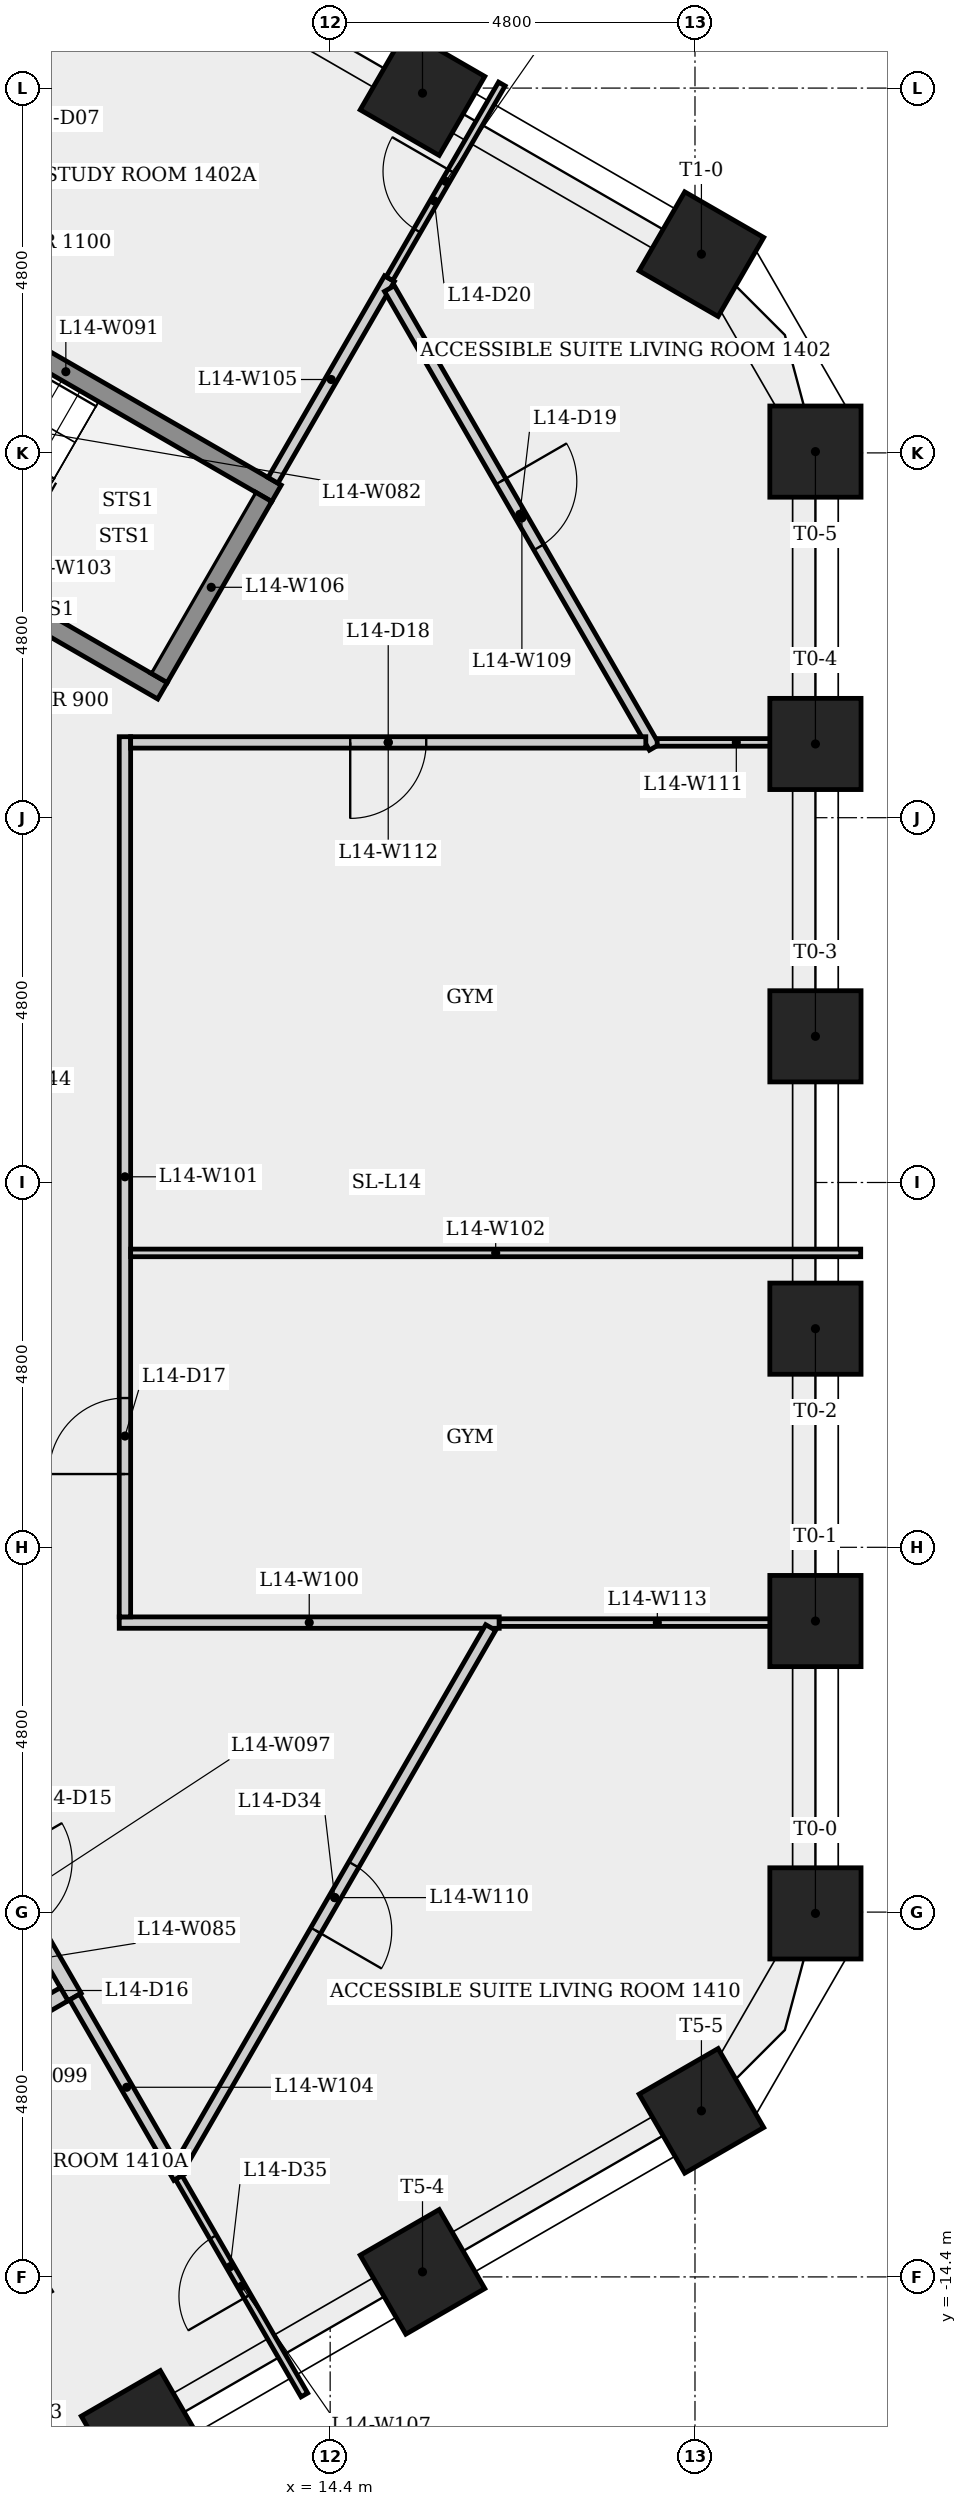
"""IFC4 building model, lengths in metres.
Left out: names, types, materials, properties, quantities, classifications, styles, units other than length and angle.
Written with IfcOpenShell. Run it as: python <this file> out.ifc"""

import sys

from ifc_helpers import new_model, si_unit, direction, frame, frame_2d, origin, origin_2d, place, context, subcontext, project, spatial, rectangle, extrude, element, fill, save


model = new_model("IFC4")
c1 = context("Model", 3, precision=1e-05, world=origin(), true_north=direction((0.0, 1.0)))
c2 = subcontext(c1, "Body", "Model", "MODEL_VIEW")
j1 = project(units=[si_unit("LENGTHUNIT", "METRE"), si_unit("PLANEANGLEUNIT", "RADIAN")], contexts=[c1])
p1 = place(None, origin())
s1 = spatial("IfcSite", under=j1, at=p1, CompositionType="ELEMENT")
p2 = place(p1, origin())
s2 = spatial("IfcBuilding", under=s1, at=p2, CompositionType="ELEMENT")
p3 = place(p2, frame((0.0, 0.0, 56.1)))
s3 = spatial("IfcBuildingStorey", under=s2, at=p3, CompositionType="ELEMENT", Elevation=56.1)
for number, where, z_axis, x_axis in (
    (1, (20.785, -9.617, 0.0), (0.0, 0.0, 1.0), (1.0, 0.0, 0.0)),
    (2, (20.785, -5.77, 0.0), (0.0, 0.0, 1.0), (1.0, 0.0, 0.0)),
    (3, (20.785, -1.923, 0.0), (0.0, 0.0, 1.0), (1.0, 0.0, 0.0)),
    (4, (20.785, 1.923, 0.0), (0.0, 0.0, 1.0), (1.0, 0.0, 0.0)),
    (5, (20.785, 5.77, 0.0), (0.0, 0.0, 1.0), (1.0, 0.0, 0.0)),
    (6, (20.785, 9.617, 0.0), (0.0, 0.0, 1.0), (1.0, 0.0, 0.0)),
    (7, (19.285, 12.215, 0.0), (0.0, 0.0, 1.0), (0.5, 0.866, 0.0)),
    (8, (15.615, 14.334, 0.0), (0.0, 0.0, 1.0), (0.5, 0.866, 0.0)),
    (9, (11.945, -16.452, 0.0), (0.0, 0.0, 1.0), (0.5, -0.866, 0.0)),
    (10, (15.615, -14.334, 0.0), (0.0, 0.0, 1.0), (0.5, -0.866, 0.0)),
    (11, (19.285, -12.215, 0.0), (0.0, 0.0, 1.0), (0.5, -0.866, 0.0)),
):
    element("IfcColumn", number, at=place(p3, frame(where, z_axis=z_axis, x_axis=x_axis)), inside=s3, PredefinedType="COLUMN", context=c2, shape_type="SweptSolid", body=[
        extrude(rectangle(XDim=1.2, YDim=1.2, at=origin_2d()), origin(), (0.0, 0.0, 1.0), 3.4),
    ])
p4 = place(p3, frame((8.151, 12.268, 0.0), z_axis=(0.0, 0.0, 1.0), x_axis=(0.866025499775, -0.499999833739, 0.0)))
e12 = element("IfcWall", 12, at=p4, inside=s3, PredefinedType="SHEAR", context=c2, shape_type="SweptSolid", body=[
    extrude(rectangle(XDim=6.4, YDim=0.25, at=frame_2d((3.2, 0.0))), origin(), (0.0, 0.0, 1.0), 3.05),
])
p5 = place(p3, frame((9.537, -8.119, 0.0), z_axis=(0.0, 0.0, 1.0), x_axis=(0.499990139034, -0.866031096941, 0.0)))
e13 = element("IfcWall", 13, at=p5, inside=s3, PredefinedType="PARTITIONING", context=c2, shape_type="SweptSolid", body=[
    extrude(rectangle(XDim=3.0, YDim=0.2, at=frame_2d((1.5, 0.0))), origin(), (0.0, 0.0, 1.0), 3.05),
])
p6 = place(p5, frame((0.935, 0.0, 0.0)))
e14 = element("IfcOpeningElement", 14, at=p6, cuts=e13, PredefinedType="OPENING", context=c2, shape_type="SweptSolid", body=[
    extrude(rectangle(XDim=1.0, YDim=2.1, at=frame_2d((0.5, 1.05))), frame((0.0, 0.11, 0.0), z_axis=(0.0, -1.0, 0.0), x_axis=(1.0, 0.0, 0.0)), (0.0, 0.0, 1.0), 0.22),
])
p7 = place(p3, frame((10.901, -10.681, 0.0), z_axis=(0.0, 0.0, 1.0), x_axis=(-0.866009402589, -0.500027713859, 0.0)))
e15 = element("IfcWall", 15, at=p7, inside=s3, PredefinedType="PARTITIONING", context=c2, shape_type="SweptSolid", body=[
    extrude(rectangle(XDim=2.1, YDim=0.2, at=frame_2d((1.05, 0.0))), origin(), (0.0, 0.0, 1.0), 3.05),
])
p8 = place(p3, frame((11.625, -5.791, 0.0), z_axis=(0.0, 0.0, 1.0), x_axis=(1.0, 0.0, 0.0)))
e16 = element("IfcWall", 16, at=p8, inside=s3, PredefinedType="PARTITIONING", context=c2, shape_type="SweptSolid", body=[
    extrude(rectangle(XDim=5.0, YDim=0.15, at=frame_2d((2.5, 0.0))), origin(), (0.0, 0.0, 1.0), 3.05),
])
p9 = place(p3, frame((11.7, -5.716, 0.0), z_axis=(0.0, 0.0, 1.0), x_axis=(0.0, 1.0, 0.0)))
e17 = element("IfcWall", 17, at=p9, inside=s3, PredefinedType="PARTITIONING", context=c2, shape_type="SweptSolid", body=[
    extrude(rectangle(XDim=11.582, YDim=0.15, at=frame_2d((5.791, 0.0))), origin(), (0.0, 0.0, 1.0), 3.05),
])
p10 = place(p9, frame((1.88, 0.0, 0.0)))
e18 = element("IfcOpeningElement", 18, at=p10, cuts=e17, PredefinedType="OPENING", context=c2, shape_type="SweptSolid", body=[
    extrude(rectangle(XDim=1.0, YDim=2.1, at=frame_2d((0.5, 1.05))), frame((0.0, 0.085, 0.0), z_axis=(0.0, -1.0, 0.0), x_axis=(1.0, 0.0, 0.0)), (0.0, 0.0, 1.0), 0.17),
])
p11 = place(p3, frame((11.775, -0.927, 0.0), z_axis=(0.0, 0.0, 1.0), x_axis=(1.0, 0.0, 0.0)))
e19 = element("IfcWall", 19, at=p11, inside=s3, PredefinedType="PARTITIONING", context=c2, shape_type="SweptSolid", body=[
    extrude(rectangle(XDim=9.606, YDim=0.1, at=frame_2d((4.803, 0.0))), origin(), (0.0, 0.0, 1.0), 3.05),
])
p12 = place(p3, frame((12.194, 6.47, 0.0), z_axis=(0.0, 0.0, 1.0), x_axis=(-0.866025499775, 0.499999833739, 0.0)))
e20 = element("IfcWall", 20, at=p12, inside=s3, PredefinedType="SHEAR", context=c2, shape_type="SweptSolid", body=[
    extrude(rectangle(XDim=6.4, YDim=0.25, at=frame_2d((3.2, 0.0))), origin(), (0.0, 0.0, 1.0), 3.05),
])
p13 = place(p12, frame((5.25, 0.0, 0.0)))
e21 = element("IfcOpeningElement", 21, at=p13, cuts=e20, PredefinedType="OPENING", context=c2, shape_type="SweptSolid", body=[
    extrude(rectangle(XDim=1.0, YDim=2.1, at=frame_2d((0.5, 1.05))), frame((0.0, 0.135, 0.0), z_axis=(0.0, -1.0, 0.0), x_axis=(1.0, 0.0, 0.0)), (0.0, 0.0, 1.0), 0.27),
])
p14 = place(p3, frame((12.409, -13.093, 0.0), z_axis=(0.0, 0.0, 1.0), x_axis=(-0.4999587362, 0.86604922614, 0.0)))
e22 = element("IfcWall", 22, at=p14, inside=s3, PredefinedType="PARTITIONING", context=c2, shape_type="SweptSolid", body=[
    extrude(rectangle(XDim=2.743, YDim=0.15, at=frame_2d((1.372, 0.0))), origin(), (0.0, 0.0, 1.0), 3.05),
])
p15 = place(p3, frame((13.648, 9.239, 0.0), z_axis=(0.0, 0.0, 1.0), x_axis=(0.500012104326, 0.866018415236, 0.0)))
e23 = element("IfcWall", 23, at=p15, inside=s3, PredefinedType="PARTITIONING", context=c2, shape_type="SweptSolid", body=[
    extrude(rectangle(XDim=3.064, YDim=0.15, at=frame_2d((1.532, 0.0))), origin(), (0.0, 0.0, 1.0), 3.05),
])
p16 = place(p3, frame((13.523, 9.022, 0.0), z_axis=(0.0, 0.0, 1.0), x_axis=(-0.500034990121, -0.866005201286, 0.0)))
e24 = element("IfcWall", 24, at=p16, inside=s3, PredefinedType="SHEAR", context=c2, shape_type="SweptSolid", body=[
    extrude(rectangle(XDim=2.75, YDim=0.25, at=frame_2d((1.375, 0.0))), origin(), (0.0, 0.0, 1.0), 3.05),
])
p17 = place(p3, frame((14.061, -15.954, 0.0), z_axis=(0.0, 0.0, 1.0), x_axis=(-0.500001784407, 0.866024373554, 0.0)))
e25 = element("IfcWall", 25, at=p17, inside=s3, PredefinedType="PARTITIONING", context=c2, shape_type="SweptSolid", body=[
    extrude(rectangle(XDim=3.304, YDim=0.1, at=frame_2d((1.652, 0.0))), origin(), (0.0, 0.0, 1.0), 3.05),
])
p18 = place(p17, frame((1.5, 0.0, 0.0)))
e26 = element("IfcOpeningElement", 26, at=p18, cuts=e25, PredefinedType="OPENING", context=c2, shape_type="SweptSolid", body=[
    extrude(rectangle(XDim=0.9, YDim=2.1, at=frame_2d((0.45, 1.05))), frame((0.0, 0.06, 0.0), z_axis=(0.0, -1.0, 0.0), x_axis=(1.0, 0.0, 0.0)), (0.0, 0.0, 1.0), 0.12),
])
p19 = place(p3, frame((15.18, 11.893, 0.0), z_axis=(0.0, 0.0, 1.0), x_axis=(0.500036881675, 0.866004109092, 0.0)))
e27 = element("IfcWall", 27, at=p19, inside=s3, PredefinedType="PARTITIONING", context=c2, shape_type="SweptSolid", body=[
    extrude(rectangle(XDim=2.957, YDim=0.1, at=frame_2d((1.479, 0.0))), origin(), (0.0, 0.0, 1.0), 3.05),
])
p20 = place(p19, frame((0.731, 0.0, 0.0)))
e28 = element("IfcOpeningElement", 28, at=p20, cuts=e27, PredefinedType="OPENING", context=c2, shape_type="SweptSolid", body=[
    extrude(rectangle(XDim=0.9, YDim=2.1, at=frame_2d((0.45, 1.05))), frame((0.0, 0.06, 0.0), z_axis=(0.0, -1.0, 0.0), x_axis=(1.0, 0.0, 0.0)), (0.0, 0.0, 1.0), 0.12),
])
p21 = place(p3, frame((15.18, 11.763, 0.0), z_axis=(0.0, 0.0, 1.0), x_axis=(0.499996319731, -0.866027528578, 0.0)))
e29 = element("IfcWall", 29, at=p21, inside=s3, PredefinedType="PARTITIONING", context=c2, shape_type="SweptSolid", body=[
    extrude(rectangle(XDim=6.971, YDim=0.15, at=frame_2d((3.485, 0.0))), origin(), (0.0, 0.0, 1.0), 3.05),
])
p22 = place(p21, frame((2.93, 0.0, 0.0)))
e30 = element("IfcOpeningElement", 30, at=p22, cuts=e29, PredefinedType="OPENING", context=c2, shape_type="SweptSolid", body=[
    extrude(rectangle(XDim=1.0, YDim=2.1, at=frame_2d((0.5, 1.05))), frame((0.0, 0.085, 0.0), z_axis=(0.0, -1.0, 0.0), x_axis=(1.0, 0.0, 0.0)), (0.0, 0.0, 1.0), 0.17),
])
p23 = place(p3, frame((16.512, -5.856, 0.0), z_axis=(0.0, 0.0, 1.0), x_axis=(-0.500007444845, -0.866021105458, 0.0)))
e31 = element("IfcWall", 31, at=p23, inside=s3, PredefinedType="PARTITIONING", context=c2, shape_type="SweptSolid", body=[
    extrude(rectangle(XDim=8.206, YDim=0.15, at=frame_2d((4.103, 0.0))), origin(), (0.0, 0.0, 1.0), 3.05),
])
p24 = place(p23, frame((3.603, 0.0, 0.0)))
e32 = element("IfcOpeningElement", 32, at=p24, cuts=e31, PredefinedType="OPENING", context=c2, shape_type="SweptSolid", body=[
    extrude(rectangle(XDim=1.0, YDim=2.1, at=frame_2d((0.5, 1.05))), frame((0.0, 0.085, 0.0), z_axis=(0.0, -1.0, 0.0), x_axis=(1.0, 0.0, 0.0)), (0.0, 0.0, 1.0), 0.17),
])
p25 = place(p3, frame((18.703, 5.791, 0.0), z_axis=(0.0, 0.0, 1.0), x_axis=(1.0, 0.0, 0.0)))
e33 = element("IfcWall", 33, at=p25, inside=s3, PredefinedType="PARTITIONING", context=c2, shape_type="SweptSolid", body=[
    extrude(rectangle(XDim=2.082, YDim=0.1, at=frame_2d((1.041, 0.0))), origin(), (0.0, 0.0, 1.0), 3.05),
])
p26 = place(p3, frame((18.553, 5.791, 0.0), z_axis=(0.0, 0.0, 1.0), x_axis=(-1.0, 0.0, 0.0)))
e34 = element("IfcWall", 34, at=p26, inside=s3, PredefinedType="PARTITIONING", context=c2, shape_type="SweptSolid", body=[
    extrude(rectangle(XDim=6.778, YDim=0.15, at=frame_2d((3.389, 0.0))), origin(), (0.0, 0.0, 1.0), 3.05),
])
p27 = place(p26, frame((2.889, 0.0, 0.0)))
e35 = element("IfcOpeningElement", 35, at=p27, cuts=e34, PredefinedType="OPENING", context=c2, shape_type="SweptSolid", body=[
    extrude(rectangle(XDim=1.0, YDim=2.1, at=frame_2d((0.5, 1.05))), frame((0.0, 0.085, 0.0), z_axis=(0.0, -1.0, 0.0), x_axis=(1.0, 0.0, 0.0)), (0.0, 0.0, 1.0), 0.17),
])
p28 = place(p3, frame((20.785, -5.791, 0.0), z_axis=(0.0, 0.0, 1.0), x_axis=(-1.0, 0.0, 0.0)))
e36 = element("IfcWall", 36, at=p28, inside=s3, PredefinedType="PARTITIONING", context=c2, shape_type="SweptSolid", body=[
    extrude(rectangle(XDim=4.16, YDim=0.1, at=frame_2d((2.08, 0.0))), origin(), (0.0, 0.0, 1.0), 3.05),
])
p29 = place(p10, origin())
e37 = element("IfcDoor", 37, at=p29, inside=s3, OperationType="SINGLE_SWING_LEFT", PredefinedType="DOOR", context=c2, shape_type="SweptSolid", body=[
    extrude(rectangle(XDim=1.0, YDim=2.1, at=frame_2d((0.5, 1.05))), frame((0.0, 0.025, 0.0), z_axis=(0.0, -1.0, 0.0), x_axis=(1.0, 0.0, 0.0)), (0.0, 0.0, 1.0), 0.05),
])
fill(e18, e37)
p30 = place(p27, origin())
e38 = element("IfcDoor", 38, at=p30, inside=s3, OperationType="SINGLE_SWING_RIGHT", PredefinedType="DOOR", context=c2, shape_type="SweptSolid", body=[
    extrude(rectangle(XDim=1.0, YDim=2.1, at=frame_2d((0.5, 1.05))), frame((0.0, 0.025, 0.0), z_axis=(0.0, -1.0, 0.0), x_axis=(1.0, 0.0, 0.0)), (0.0, 0.0, 1.0), 0.05),
])
fill(e35, e38)
p31 = place(p22, origin())
e39 = element("IfcDoor", 39, at=p31, inside=s3, OperationType="SINGLE_SWING_LEFT", PredefinedType="DOOR", context=c2, shape_type="SweptSolid", body=[
    extrude(rectangle(XDim=1.0, YDim=2.1, at=frame_2d((0.5, 1.05))), frame((0.0, 0.025, 0.0), z_axis=(0.0, -1.0, 0.0), x_axis=(1.0, 0.0, 0.0)), (0.0, 0.0, 1.0), 0.05),
])
fill(e30, e39)
p32 = place(p20, origin())
e40 = element("IfcDoor", 40, at=p32, inside=s3, OperationType="SINGLE_SWING_RIGHT", PredefinedType="DOOR", context=c2, shape_type="SweptSolid", body=[
    extrude(rectangle(XDim=0.9, YDim=2.1, at=frame_2d((0.45, 1.05))), frame((0.0, 0.025, 0.0), z_axis=(0.0, -1.0, 0.0), x_axis=(1.0, 0.0, 0.0)), (0.0, 0.0, 1.0), 0.05),
])
fill(e28, e40)
p33 = place(p24, origin())
e41 = element("IfcDoor", 41, at=p33, inside=s3, OperationType="SINGLE_SWING_RIGHT", PredefinedType="DOOR", context=c2, shape_type="SweptSolid", body=[
    extrude(rectangle(XDim=1.0, YDim=2.1, at=frame_2d((0.5, 1.05))), frame((0.0, 0.025, 0.0), z_axis=(0.0, -1.0, 0.0), x_axis=(1.0, 0.0, 0.0)), (0.0, 0.0, 1.0), 0.05),
])
fill(e32, e41)
p34 = place(p18, origin())
e42 = element("IfcDoor", 42, at=p34, inside=s3, OperationType="SINGLE_SWING_LEFT", PredefinedType="DOOR", context=c2, shape_type="SweptSolid", body=[
    extrude(rectangle(XDim=0.9, YDim=2.1, at=frame_2d((0.45, 1.05))), frame((0.0, 0.025, 0.0), z_axis=(0.0, -1.0, 0.0), x_axis=(1.0, 0.0, 0.0)), (0.0, 0.0, 1.0), 0.05),
])
fill(e26, e42)
save(model, sys.argv[1])
